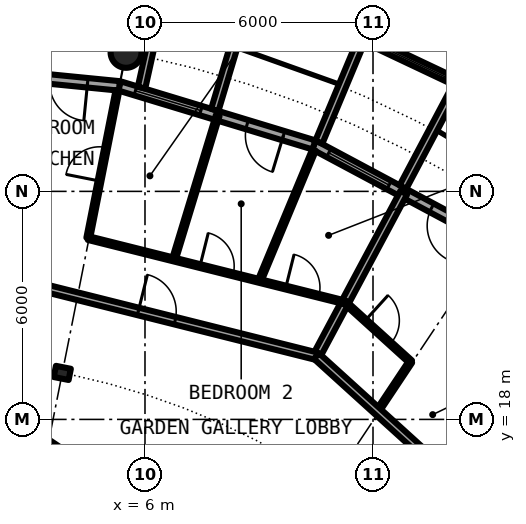
"""IFC4 building model, lengths in metres.
Left out: names, types, materials, properties, quantities, classifications, styles, units other than length and angle.
Written with IfcOpenShell. Run it as: python <this file> out.ifc"""

import sys

from ifc_helpers import new_model, si_unit, direction, frame, frame_2d, origin, origin_2d, place, context, subcontext, project, spatial, rectangle, circle, hollow_circle, i_section, extrude, element, fill, save


model = new_model("IFC4")
c1 = context("Model", 3, precision=1e-05, world=origin(), true_north=direction((0.0, 1.0)))
c2 = subcontext(c1, "Body", "Model", "MODEL_VIEW")
j1 = project(units=[si_unit("LENGTHUNIT", "METRE"), si_unit("PLANEANGLEUNIT", "RADIAN")], contexts=[c1])
p1 = place(None, origin())
s1 = spatial("IfcSite", under=j1, at=p1, CompositionType="ELEMENT")
p2 = place(p1, origin())
s2 = spatial("IfcBuilding", under=s1, at=p2, CompositionType="ELEMENT")
p3 = place(p2, frame((0.0, 0.0, 196.3)))
s3 = spatial("IfcBuildingStorey", under=s2, at=p3, CompositionType="ELEMENT", Elevation=196.3)
p4 = place(p3, frame((5.501, 27.658, 0.0), z_axis=(0.0, 0.0, 1.0), x_axis=(1.0, 0.0, 0.0)))
e1 = element("IfcColumn", 1, at=p4, inside=s3, PredefinedType="COLUMN", context=c2, shape_type="SweptSolid", body=[
    extrude(hollow_circle(Radius=0.406, WallThickness=0.03, at=origin_2d()), origin(), (0.0, 0.0, 1.0), 3.05),
])
p5 = place(p3, frame((3.824, 19.223, 0.0), z_axis=(0.0, 0.0, 1.0), x_axis=(0.195090322016, 0.980785280403, 0.0)))
e2 = element("IfcColumn", 2, at=p5, inside=s3, PredefinedType="COLUMN", context=c2, shape_type="SweptSolid", body=[
    extrude(i_section(OverallWidth=0.3, OverallDepth=0.4, WebThickness=0.013, FlangeThickness=0.024, FilletRadius=0.027, at=origin_2d()), origin(), (0.0, 0.0, 1.0), 3.05),
])
p6 = place(p3, frame((15.167, 22.699, 0.0), z_axis=(0.0, 0.0, 1.0), x_axis=(-0.881915646801, 0.471407246368, 0.0)))
e3 = element("IfcWall", 3, at=p6, inside=s3, PredefinedType="SOLIDWALL", context=c2, shape_type="SweptSolid", body=[
    extrude(rectangle(XDim=5.352, YDim=0.25, at=frame_2d((2.676, 0.0))), origin(), (0.0, 0.0, 1.0), 2.7),
])
p7 = place(p6, frame((0.841, 0.0, 0.0)))
e4 = element("IfcOpeningElement", 4, at=p7, cuts=e3, PredefinedType="OPENING", context=c2, shape_type="SweptSolid", body=[
    extrude(rectangle(XDim=1.0, YDim=2.2, at=frame_2d((0.5, 1.1))), frame((0.0, 0.135, 0.0), z_axis=(0.0, -1.0, 0.0), x_axis=(1.0, 0.0, 0.0)), (0.0, 0.0, 1.0), 0.27),
])
p8 = place(p6, frame((3.111, 0.0, 0.3)))
e5 = element("IfcOpeningElement", 5, at=p8, cuts=e3, PredefinedType="OPENING", context=c2, shape_type="SweptSolid", body=[
    extrude(rectangle(XDim=1.8, YDim=2.1, at=frame_2d((0.9, 1.05))), frame((0.0, 0.135, 0.0), z_axis=(0.0, -1.0, 0.0), x_axis=(1.0, 0.0, 0.0)), (0.0, 0.0, 1.0), 0.27),
])
p9 = place(p3, frame((14.335, 26.808, -0.03), z_axis=(0.0, 0.0, 1.0), x_axis=(-0.904000060331, 0.427532327342, 0.0)))
e6 = element("IfcWall", 6, at=p9, inside=s3, PredefinedType="SOLIDWALL", context=c2, shape_type="SweptSolid", body=[
    extrude(rectangle(XDim=2.993, YDim=0.2, at=frame_2d((1.497, 0.0))), origin(), (0.0, 0.0, 1.0), 2.73),
])
p10 = place(p9, frame((0.457, 0.0, 0.33)))
e7 = element("IfcOpeningElement", 7, at=p10, cuts=e6, PredefinedType="OPENING", context=c2, shape_type="SweptSolid", body=[
    extrude(circle(Radius=1.04, at=frame_2d((1.04, 1.04))), frame((0.0, 0.11, 0.0), z_axis=(0.0, -1.0, 0.0), x_axis=(1.0, 0.0, 0.0)), (0.0, 0.0, 1.0), 0.22),
])
p11 = place(p3, frame((12.787, 24.113, -0.03), z_axis=(0.0, 0.0, 1.0), x_axis=(0.468365282436, 0.883534924159, 0.0)))
e8 = element("IfcWall", 8, at=p11, inside=s3, PredefinedType="SOLIDWALL", context=c2, shape_type="SweptSolid", body=[
    extrude(rectangle(XDim=3.006, YDim=0.2, at=frame_2d((1.503, 0.0))), origin(), (0.0, 0.0, 1.0), 2.73),
])
p12 = place(p3, frame((10.575, 25.295, -0.03), z_axis=(0.0, 0.0, 1.0), x_axis=(0.385697364644, 0.922625353492, 0.0)))
e9 = element("IfcWall", 9, at=p12, inside=s3, PredefinedType="SOLIDWALL", context=c2, shape_type="SweptSolid", body=[
    extrude(rectangle(XDim=2.883, YDim=0.2, at=frame_2d((1.442, 0.0))), origin(), (0.0, 0.0, 1.0), 2.73),
])
p13 = place(p3, frame((10.447, 25.222, 0.0), z_axis=(0.0, 0.0, 1.0), x_axis=(-0.956965678721, 0.290201119486, 0.0)))
e10 = element("IfcWall", 10, at=p13, inside=s3, PredefinedType="SOLIDWALL", context=c2, shape_type="SweptSolid", body=[
    extrude(rectangle(XDim=5.351, YDim=0.25, at=frame_2d((2.676, 0.0))), origin(), (0.0, 0.0, 1.0), 2.7),
])
p14 = place(p13, frame((0.841, 0.0, 0.0)))
e11 = element("IfcOpeningElement", 11, at=p14, cuts=e10, PredefinedType="OPENING", context=c2, shape_type="SweptSolid", body=[
    extrude(rectangle(XDim=1.0, YDim=2.2, at=frame_2d((0.5, 1.1))), frame((0.0, 0.135, 0.0), z_axis=(0.0, -1.0, 0.0), x_axis=(1.0, 0.0, 0.0)), (0.0, 0.0, 1.0), 0.27),
])
p15 = place(p13, frame((3.111, 0.0, 0.3)))
e12 = element("IfcOpeningElement", 12, at=p15, cuts=e10, PredefinedType="OPENING", context=c2, shape_type="SweptSolid", body=[
    extrude(rectangle(XDim=1.8, YDim=2.1, at=frame_2d((0.9, 1.05))), frame((0.0, 0.135, 0.0), z_axis=(0.0, -1.0, 0.0), x_axis=(1.0, 0.0, 0.0)), (0.0, 0.0, 1.0), 0.27),
])
p16 = place(p3, frame((7.837, 26.144, -0.03), z_axis=(0.0, 0.0, 1.0), x_axis=(0.287064767992, 0.957911174889, 0.0)))
e13 = element("IfcWall", 13, at=p16, inside=s3, PredefinedType="SOLIDWALL", context=c2, shape_type="SweptSolid", body=[
    extrude(rectangle(XDim=3.006, YDim=0.2, at=frame_2d((1.503, 0.0))), origin(), (0.0, 0.0, 1.0), 2.73),
])
p17 = place(p3, frame((5.909, 26.729, -0.03), z_axis=(0.0, 0.0, 1.0), x_axis=(0.216409053917, 0.976302781612, 0.0)))
e14 = element("IfcWall", 14, at=p17, inside=s3, PredefinedType="SOLIDWALL", context=c2, shape_type="SweptSolid", body=[
    extrude(rectangle(XDim=2.925, YDim=0.2, at=frame_2d((1.463, 0.0))), origin(), (0.0, 0.0, 1.0), 2.73),
])
p18 = place(p3, frame((5.326, 26.775, 0.0), z_axis=(0.0, 0.0, 1.0), x_axis=(-0.995173996315, 0.098126026407, 0.0)))
e15 = element("IfcWall", 15, at=p18, inside=s3, PredefinedType="SOLIDWALL", context=c2, shape_type="SweptSolid", body=[
    extrude(rectangle(XDim=5.352, YDim=0.25, at=frame_2d((2.676, 0.0))), origin(), (0.0, 0.0, 1.0), 2.7),
])
p19 = place(p18, frame((0.841, 0.0, 0.0)))
e16 = element("IfcOpeningElement", 16, at=p19, cuts=e15, PredefinedType="OPENING", context=c2, shape_type="SweptSolid", body=[
    extrude(rectangle(XDim=1.0, YDim=2.2, at=frame_2d((0.5, 1.1))), frame((0.0, 0.135, 0.0), z_axis=(0.0, -1.0, 0.0), x_axis=(1.0, 0.0, 0.0)), (0.0, 0.0, 1.0), 0.27),
])
p20 = place(p18, frame((3.111, 0.0, 0.3)))
e17 = element("IfcOpeningElement", 17, at=p20, cuts=e15, PredefinedType="OPENING", context=c2, shape_type="SweptSolid", body=[
    extrude(rectangle(XDim=1.8, YDim=2.1, at=frame_2d((0.9, 1.05))), frame((0.0, 0.135, 0.0), z_axis=(0.0, -1.0, 0.0), x_axis=(1.0, 0.0, 0.0)), (0.0, 0.0, 1.0), 0.27),
])
p21 = place(p3, frame((4.507, 22.771, 0.0), z_axis=(0.0, 0.0, 1.0), x_axis=(0.194030211642, 0.980995554001, 0.0)))
e18 = element("IfcWall", 18, at=p21, inside=s3, PredefinedType="PARTITIONING", context=c2, shape_type="SweptSolid", body=[
    extrude(rectangle(XDim=3.962, YDim=0.1, at=frame_2d((1.981, 0.0))), origin(), (0.0, 0.0, 1.0), 2.7),
])
p22 = place(p21, frame((1.531, 0.0, 0.0)))
e19 = element("IfcOpeningElement", 19, at=p22, cuts=e18, PredefinedType="OPENING", context=c2, shape_type="SweptSolid", body=[
    extrude(rectangle(XDim=0.9, YDim=2.3, at=frame_2d((0.45, 1.15))), frame((0.0, 0.06, 0.0), z_axis=(0.0, -1.0, 0.0), x_axis=(1.0, 0.0, 0.0)), (0.0, 0.0, 1.0), 0.12),
])
p23 = place(p3, frame((6.76, 22.207, 0.0), z_axis=(0.0, 0.0, 1.0), x_axis=(0.291291575636, 0.956634317785, 0.0)))
e20 = element("IfcWall", 20, at=p23, inside=s3, PredefinedType="PARTITIONING", context=c2, shape_type="SweptSolid", body=[
    extrude(rectangle(XDim=3.962, YDim=0.1, at=frame_2d((1.981, 0.0))), origin(), (0.0, 0.0, 1.0), 2.7),
])
p24 = place(p3, frame((9.013, 21.642, 0.0), z_axis=(0.0, 0.0, 1.0), x_axis=(0.384420204655, 0.923158223845, 0.0)))
e21 = element("IfcWall", 21, at=p24, inside=s3, PredefinedType="PARTITIONING", context=c2, shape_type="SweptSolid", body=[
    extrude(rectangle(XDim=3.73, YDim=0.1, at=frame_2d((1.865, 0.0))), origin(), (0.0, 0.0, 1.0), 2.7),
])
p25 = place(p3, frame((10.512, 19.667, 0.0), z_axis=(0.0, 0.0, 1.0), x_axis=(0.471271812246, 0.881988026553, 0.0)))
e22 = element("IfcWall", 22, at=p25, inside=s3, PredefinedType="PARTITIONING", context=c2, shape_type="SweptSolid", body=[
    extrude(rectangle(XDim=4.874, YDim=0.2, at=frame_2d((2.437, 0.0))), origin(), (0.0, 0.0, 1.0), 2.7),
])
p26 = place(p3, frame((12.118, 18.211, 0.0), z_axis=(0.0, 0.0, 1.0), x_axis=(0.554125989098, 0.832432813028, 0.0)))
e23 = element("IfcWall", 23, at=p26, inside=s3, PredefinedType="PARTITIONING", context=c2, shape_type="SweptSolid", body=[
    extrude(rectangle(XDim=1.57, YDim=0.1, at=frame_2d((0.785, 0.0))), origin(), (0.0, 0.0, 1.0), 2.7),
])
p27 = place(p3, frame((3.453, 17.36, 0.0), z_axis=(0.0, 0.0, 1.0), x_axis=(0.831437137577, -0.555618831806, 0.0)))
e24 = element("IfcWall", 24, at=p27, inside=s3, PredefinedType="PARTITIONING", context=c2, shape_type="SweptSolid", body=[
    extrude(rectangle(XDim=13.549, YDim=0.2, at=frame_2d((6.774, 0.0))), origin(), (0.0, 0.0, 1.0), 2.7),
])
p28 = place(p27, frame((4.581, 0.0, 0.0)))
e25 = element("IfcOpeningElement", 25, at=p28, cuts=e24, PredefinedType="OPENING", context=c2, shape_type="SweptSolid", body=[
    extrude(rectangle(XDim=1.0, YDim=2.3, at=frame_2d((0.5, 1.15))), frame((0.0, 0.11, 0.0), z_axis=(0.0, -1.0, 0.0), x_axis=(1.0, 0.0, 0.0)), (0.0, 0.0, 1.0), 0.22),
])
p29 = place(p3, frame((0.0, 22.3, 0.0), z_axis=(0.0, 0.0, 1.0), x_axis=(0.969975381822, -0.243203122222, 0.0)))
e26 = element("IfcWall", 26, at=p29, inside=s3, PredefinedType="PARTITIONING", context=c2, shape_type="SweptSolid", body=[
    extrude(rectangle(XDim=10.843, YDim=0.2, at=frame_2d((5.421, 0.0))), origin(), (0.0, 0.0, 1.0), 2.7),
])
p30 = place(p29, frame((6.002, 0.0, 0.0)))
e27 = element("IfcOpeningElement", 27, at=p30, cuts=e26, PredefinedType="OPENING", context=c2, shape_type="SweptSolid", body=[
    extrude(rectangle(XDim=1.0, YDim=2.3, at=frame_2d((0.5, 1.15))), frame((0.0, 0.11, 0.0), z_axis=(0.0, -1.0, 0.0), x_axis=(1.0, 0.0, 0.0)), (0.0, 0.0, 1.0), 0.22),
])
p31 = place(p3, frame((10.512, 19.667, 0.0), z_axis=(0.0, 0.0, 1.0), x_axis=(0.740849323054, -0.67167125927, 0.0)))
e28 = element("IfcWall", 28, at=p31, inside=s3, PredefinedType="PARTITIONING", context=c2, shape_type="SweptSolid", body=[
    extrude(rectangle(XDim=10.842, YDim=0.2, at=frame_2d((5.421, 0.0))), origin(), (0.0, 0.0, 1.0), 2.7),
])
p32 = place(p31, frame((6.003, 0.0, 0.0)))
e29 = element("IfcOpeningElement", 29, at=p32, cuts=e28, PredefinedType="OPENING", context=c2, shape_type="SweptSolid", body=[
    extrude(rectangle(XDim=1.0, YDim=2.3, at=frame_2d((0.5, 1.15))), frame((0.0, 0.11, 0.0), z_axis=(0.0, -1.0, 0.0), x_axis=(1.0, 0.0, 0.0)), (0.0, 0.0, 1.0), 0.22),
])
p33 = place(p3, frame((4.507, 22.771, 0.0), z_axis=(0.0, 0.0, 1.0), x_axis=(0.970020829306, -0.243021790611, 0.0)))
e30 = element("IfcWall", 30, at=p33, inside=s3, PredefinedType="PARTITIONING", context=c2, shape_type="SweptSolid", body=[
    extrude(rectangle(XDim=6.971, YDim=0.1, at=frame_2d((3.485, 0.0))), origin(), (0.0, 0.0, 1.0), 2.7),
])
p34 = place(p33, frame((3.031, 0.0, 0.0)))
e31 = element("IfcOpeningElement", 31, at=p34, cuts=e30, PredefinedType="OPENING", context=c2, shape_type="SweptSolid", body=[
    extrude(rectangle(XDim=0.9, YDim=2.3, at=frame_2d((0.45, 1.15))), frame((0.0, 0.06, 0.0), z_axis=(0.0, -1.0, 0.0), x_axis=(1.0, 0.0, 0.0)), (0.0, 0.0, 1.0), 0.12),
])
p35 = place(p33, frame((5.358, 0.0, 0.0)))
e32 = element("IfcOpeningElement", 32, at=p35, cuts=e30, PredefinedType="OPENING", context=c2, shape_type="SweptSolid", body=[
    extrude(rectangle(XDim=0.9, YDim=2.3, at=frame_2d((0.45, 1.15))), frame((0.0, 0.06, 0.0), z_axis=(0.0, -1.0, 0.0), x_axis=(1.0, 0.0, 0.0)), (0.0, 0.0, 1.0), 0.12),
])
p36 = place(p3, frame((11.271, 21.074, 0.0), z_axis=(0.0, 0.0, 1.0), x_axis=(0.74087097024, -0.671647381783, 0.0)))
e33 = element("IfcWall", 33, at=p36, inside=s3, PredefinedType="PARTITIONING", context=c2, shape_type="SweptSolid", body=[
    extrude(rectangle(XDim=2.324, YDim=0.1, at=frame_2d((1.162, 0.0))), origin(), (0.0, 0.0, 1.0), 2.7),
])
p37 = place(p36, frame((0.705, 0.0, 0.0)))
e34 = element("IfcOpeningElement", 34, at=p37, cuts=e33, PredefinedType="OPENING", context=c2, shape_type="SweptSolid", body=[
    extrude(rectangle(XDim=0.9, YDim=2.3, at=frame_2d((0.45, 1.15))), frame((0.0, 0.06, 0.0), z_axis=(0.0, -1.0, 0.0), x_axis=(1.0, 0.0, 0.0)), (0.0, 0.0, 1.0), 0.12),
])
p38 = place(p7, origin())
e35 = element("IfcDoor", 35, at=p38, inside=s3, OperationType="SINGLE_SWING_LEFT", PredefinedType="DOOR", context=c2, shape_type="SweptSolid", body=[
    extrude(rectangle(XDim=1.0, YDim=2.2, at=frame_2d((0.5, 1.1))), frame((0.0, 0.025, 0.0), z_axis=(0.0, -1.0, 0.0), x_axis=(1.0, 0.0, 0.0)), (0.0, 0.0, 1.0), 0.05),
])
fill(e4, e35)
p39 = place(p8, origin())
e36 = element("IfcWindow", 36, at=p39, inside=s3, PartitioningType="SINGLE_PANEL", PredefinedType="WINDOW", context=c2, shape_type="SweptSolid", body=[
    extrude(rectangle(XDim=1.8, YDim=2.1, at=frame_2d((0.9, 1.05))), frame((0.0, 0.03, 0.0), z_axis=(0.0, -1.0, 0.0), x_axis=(1.0, 0.0, 0.0)), (0.0, 0.0, 1.0), 0.06),
])
fill(e5, e36)
p40 = place(p10, origin())
e37 = element("IfcWindow", 37, at=p40, inside=s3, PartitioningType="SINGLE_PANEL", PredefinedType="WINDOW", context=c2, shape_type="SweptSolid", body=[
    extrude(circle(Radius=1.04, at=frame_2d((1.04, 1.04))), frame((0.0, 0.03, 0.0), z_axis=(0.0, -1.0, 0.0), x_axis=(1.0, 0.0, 0.0)), (0.0, 0.0, 1.0), 0.06),
])
fill(e7, e37)
p41 = place(p14, origin())
e38 = element("IfcDoor", 38, at=p41, inside=s3, OperationType="SINGLE_SWING_LEFT", PredefinedType="DOOR", context=c2, shape_type="SweptSolid", body=[
    extrude(rectangle(XDim=1.0, YDim=2.2, at=frame_2d((0.5, 1.1))), frame((0.0, 0.025, 0.0), z_axis=(0.0, -1.0, 0.0), x_axis=(1.0, 0.0, 0.0)), (0.0, 0.0, 1.0), 0.05),
])
fill(e11, e38)
p42 = place(p15, origin())
e39 = element("IfcWindow", 39, at=p42, inside=s3, PartitioningType="SINGLE_PANEL", PredefinedType="WINDOW", context=c2, shape_type="SweptSolid", body=[
    extrude(rectangle(XDim=1.8, YDim=2.1, at=frame_2d((0.9, 1.05))), frame((0.0, 0.03, 0.0), z_axis=(0.0, -1.0, 0.0), x_axis=(1.0, 0.0, 0.0)), (0.0, 0.0, 1.0), 0.06),
])
fill(e12, e39)
p43 = place(p19, origin())
e40 = element("IfcDoor", 40, at=p43, inside=s3, OperationType="SINGLE_SWING_LEFT", PredefinedType="DOOR", context=c2, shape_type="SweptSolid", body=[
    extrude(rectangle(XDim=1.0, YDim=2.2, at=frame_2d((0.5, 1.1))), frame((0.0, 0.025, 0.0), z_axis=(0.0, -1.0, 0.0), x_axis=(1.0, 0.0, 0.0)), (0.0, 0.0, 1.0), 0.05),
])
fill(e16, e40)
p44 = place(p37, origin())
e41 = element("IfcDoor", 41, at=p44, inside=s3, OperationType="SINGLE_SWING_LEFT", PredefinedType="DOOR", context=c2, shape_type="SweptSolid", body=[
    extrude(rectangle(XDim=0.9, YDim=2.3, at=frame_2d((0.45, 1.15))), frame((0.0, 0.025, 0.0), z_axis=(0.0, -1.0, 0.0), x_axis=(1.0, 0.0, 0.0)), (0.0, 0.0, 1.0), 0.05),
])
fill(e34, e41)
p45 = place(p30, origin())
e42 = element("IfcDoor", 42, at=p45, inside=s3, OperationType="SINGLE_SWING_RIGHT", PredefinedType="DOOR", context=c2, shape_type="SweptSolid", body=[
    extrude(rectangle(XDim=1.0, YDim=2.3, at=frame_2d((0.5, 1.15))), frame((0.0, 0.025, 0.0), z_axis=(0.0, -1.0, 0.0), x_axis=(1.0, 0.0, 0.0)), (0.0, 0.0, 1.0), 0.05),
])
fill(e27, e42)
p46 = place(p22, origin())
e43 = element("IfcDoor", 43, at=p46, inside=s3, OperationType="SINGLE_SWING_RIGHT", PredefinedType="DOOR", context=c2, shape_type="SweptSolid", body=[
    extrude(rectangle(XDim=0.9, YDim=2.3, at=frame_2d((0.45, 1.15))), frame((0.0, 0.025, 0.0), z_axis=(0.0, -1.0, 0.0), x_axis=(1.0, 0.0, 0.0)), (0.0, 0.0, 1.0), 0.05),
])
fill(e19, e43)
p47 = place(p34, origin())
e44 = element("IfcDoor", 44, at=p47, inside=s3, OperationType="SINGLE_SWING_LEFT", PredefinedType="DOOR", context=c2, shape_type="SweptSolid", body=[
    extrude(rectangle(XDim=0.9, YDim=2.3, at=frame_2d((0.45, 1.15))), frame((0.0, 0.025, 0.0), z_axis=(0.0, -1.0, 0.0), x_axis=(1.0, 0.0, 0.0)), (0.0, 0.0, 1.0), 0.05),
])
fill(e31, e44)
p48 = place(p35, origin())
e45 = element("IfcDoor", 45, at=p48, inside=s3, OperationType="SINGLE_SWING_RIGHT", PredefinedType="DOOR", context=c2, shape_type="SweptSolid", body=[
    extrude(rectangle(XDim=0.9, YDim=2.3, at=frame_2d((0.45, 1.15))), frame((0.0, 0.025, 0.0), z_axis=(0.0, -1.0, 0.0), x_axis=(1.0, 0.0, 0.0)), (0.0, 0.0, 1.0), 0.05),
])
fill(e32, e45)
save(model, sys.argv[1])
